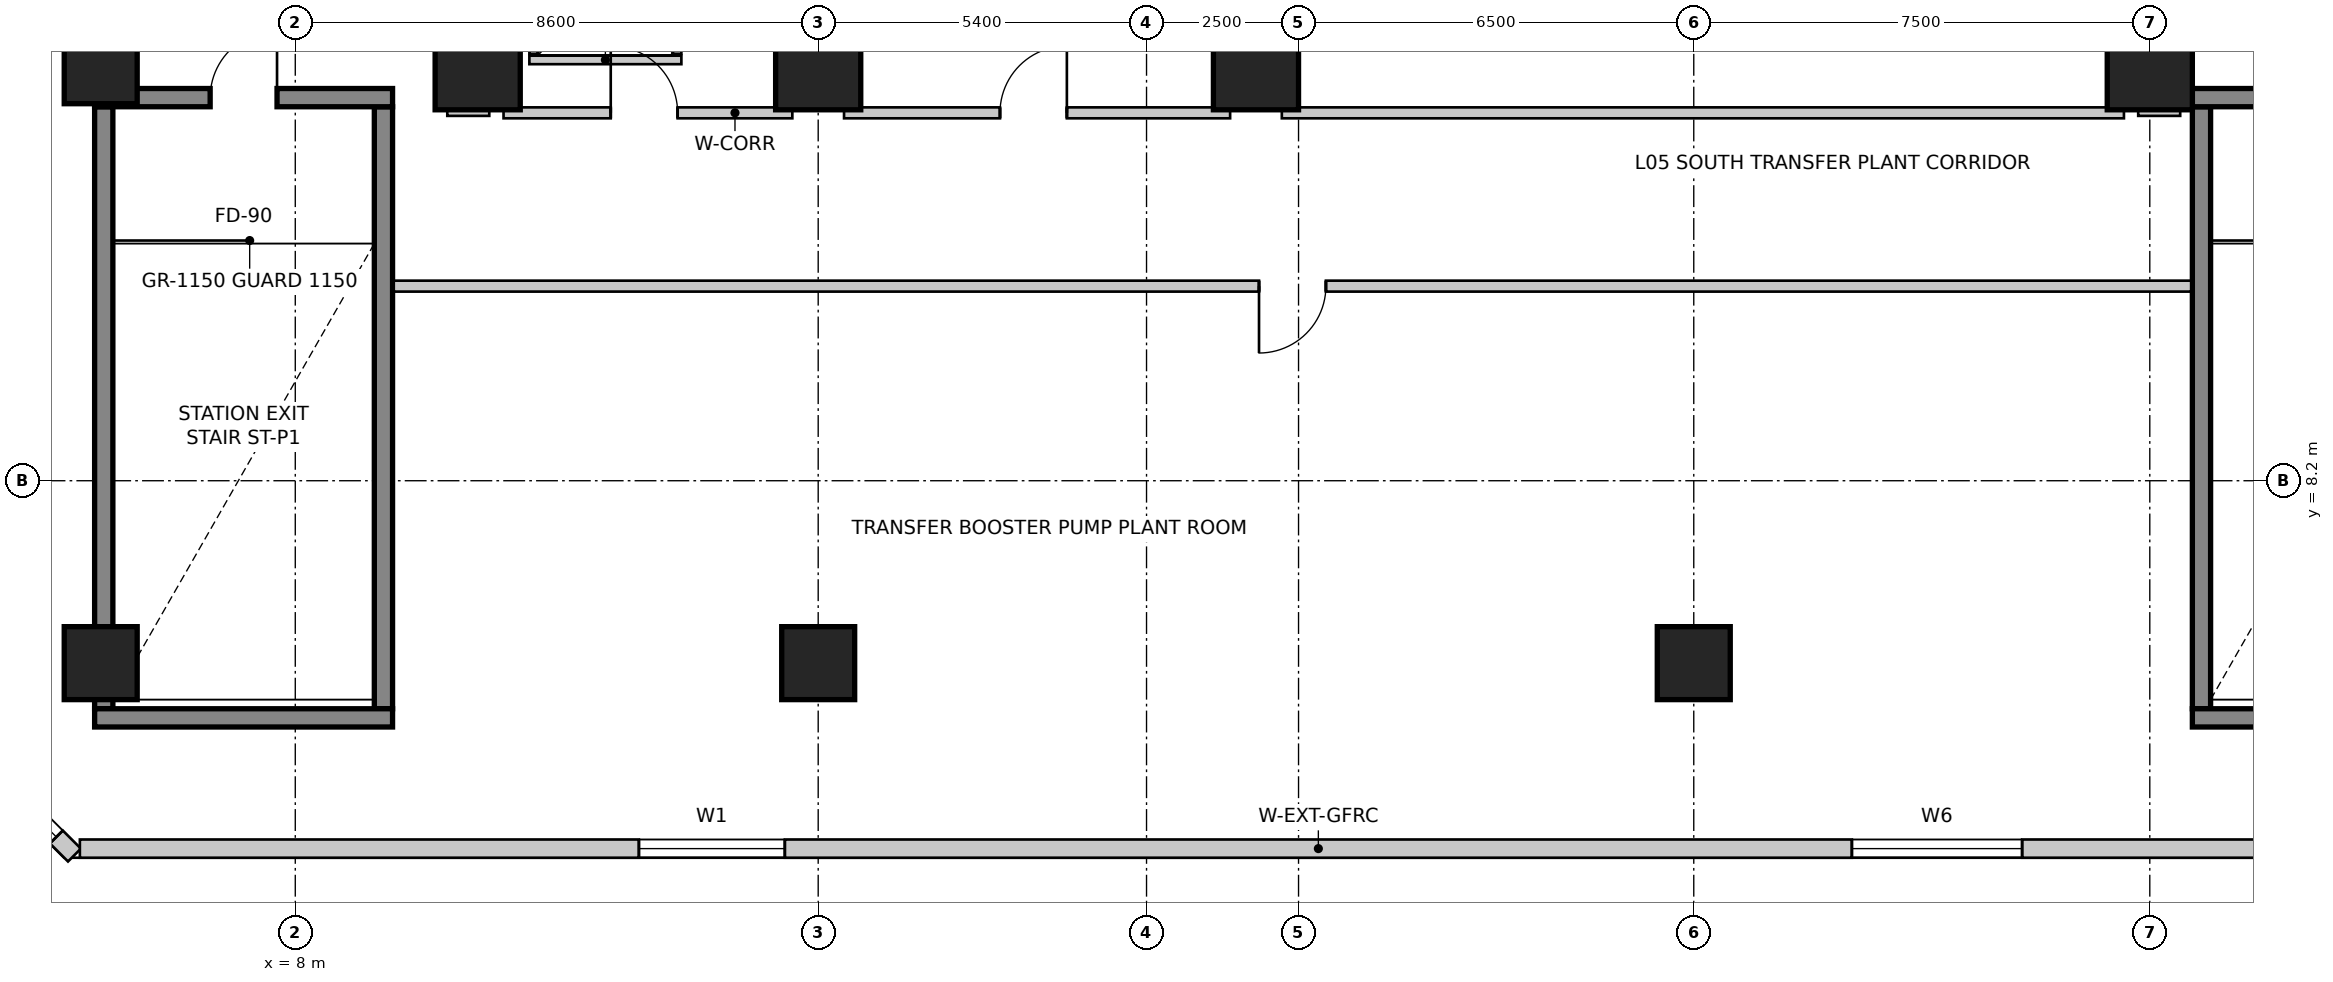
"""IFC4 building model, lengths in metres.
Left out: names, types, materials, properties, quantities, classifications, styles, units other than length and angle.
Written with IfcOpenShell. Run it as: python <this file> out.ifc"""

import sys

from ifc_helpers import new_model, si_unit, direction, frame, frame_2d, origin, origin_2d, place, context, subcontext, project, spatial, rectangle, extrude, source, transform, mapped, element, fill, save


model = new_model("IFC4")
c1 = context("Model", 3, precision=1e-05, world=origin(), true_north=direction((0.0, 1.0)))
c2 = subcontext(c1, "Body", "Model", "MODEL_VIEW")
j1 = project(units=[si_unit("LENGTHUNIT", "METRE"), si_unit("PLANEANGLEUNIT", "RADIAN")], contexts=[c1])
p1 = place(None, origin())
s1 = spatial("IfcSite", under=j1, at=p1, CompositionType="ELEMENT")
p2 = place(p1, origin())
s2 = spatial("IfcBuilding", under=s1, at=p2, CompositionType="ELEMENT")
p3 = place(p2, frame((0.0, 0.0, 21.6)))
s3 = spatial("IfcBuildingStorey", under=s2, at=p3, CompositionType="ELEMENT", Elevation=21.6)
for number, where, z_axis, x_axis in (
    (1, (4.85, 4.45, 0.0), (0.0, 0.0, 1.0), (0.0, 1.0, 0.0)),
    (2, (9.45, 4.45, 0.0), (0.0, 0.0, 1.0), (0.0, 1.0, 0.0)),
):
    element("IfcWall", number, at=place(p3, frame(where, z_axis=z_axis, x_axis=x_axis)), inside=s3, PredefinedType="SHEAR", context=c2, shape_type="SweptSolid", body=[
        extrude(rectangle(XDim=9.9, YDim=0.3, at=frame_2d((4.95, 0.0))), origin(), (0.0, 0.0, 1.0), 5.4),
    ])
p4 = place(p3, frame((4.7, 4.3, 0.0), z_axis=(0.0, 0.0, 1.0), x_axis=(1.0, 0.0, 0.0)))
e3 = element("IfcWall", 3, at=p4, inside=s3, PredefinedType="SHEAR", context=c2, shape_type="SweptSolid", body=[
    extrude(rectangle(XDim=4.9, YDim=0.3, at=frame_2d((2.45, 0.0))), origin(), (0.0, 0.0, 1.0), 5.4),
])
p5 = place(p3, frame((4.7, 14.5, 0.0), z_axis=(0.0, 0.0, 1.0), x_axis=(1.0, 0.0, 0.0)))
e4 = element("IfcWall", 4, at=p5, inside=s3, PredefinedType="SHEAR", context=c2, shape_type="SweptSolid", body=[
    extrude(rectangle(XDim=4.9, YDim=0.3, at=frame_2d((2.45, 0.0))), origin(), (0.0, 0.0, 1.0), 5.4),
])
m1 = source(origin(), c2, "Body", "SweptSolid", [
    extrude(rectangle(XDim=1.1, YDim=2.15, at=frame_2d((0.55, 1.075))), frame((0.0, 0.16, 0.0), z_axis=(0.0, -1.0, 0.0), x_axis=(1.0, 0.0, 0.0)), (0.0, 0.0, 1.0), 0.32),
])
p6 = place(p5, frame((1.9, 0.0, 0.0)))
e5 = element("IfcOpeningElement", 5, at=p6, cuts=e4, PredefinedType="OPENING", context=c2, shape_type="MappedRepresentation", body=[
    mapped(m1, transform((0.0, 0.0, 0.0), scale=1.0)),
])
p7 = place(p3, frame((39.35, 4.45, 0.0), z_axis=(0.0, 0.0, 1.0), x_axis=(0.0, 1.0, 0.0)))
e6 = element("IfcWall", 6, at=p7, inside=s3, PredefinedType="SHEAR", context=c2, shape_type="SweptSolid", body=[
    extrude(rectangle(XDim=9.9, YDim=0.3, at=frame_2d((4.95, 0.0))), origin(), (0.0, 0.0, 1.0), 5.4),
])
p8 = place(p3, frame((39.2, 4.3, 0.0), z_axis=(0.0, 0.0, 1.0), x_axis=(1.0, 0.0, 0.0)))
e7 = element("IfcWall", 7, at=p8, inside=s3, PredefinedType="SHEAR", context=c2, shape_type="SweptSolid", body=[
    extrude(rectangle(XDim=4.9, YDim=0.3, at=frame_2d((2.45, 0.0))), origin(), (0.0, 0.0, 1.0), 5.4),
])
p9 = place(p3, frame((39.2, 14.5, 0.0), z_axis=(0.0, 0.0, 1.0), x_axis=(1.0, 0.0, 0.0)))
e8 = element("IfcWall", 8, at=p9, inside=s3, PredefinedType="SHEAR", context=c2, shape_type="SweptSolid", body=[
    extrude(rectangle(XDim=4.9, YDim=0.3, at=frame_2d((2.45, 0.0))), origin(), (0.0, 0.0, 1.0), 5.4),
])
p10 = place(p9, frame((1.9, 0.0, 0.0)))
e9 = element("IfcOpeningElement", 9, at=p10, cuts=e8, PredefinedType="OPENING", context=c2, shape_type="MappedRepresentation", body=[
    mapped(m1, transform((0.0, 0.0, 0.0), scale=1.0)),
])
m2 = source(origin(), c2, "Body", "SweptSolid", [
    extrude(rectangle(XDim=1.2, YDim=1.2, at=origin_2d()), origin(), (0.0, 0.0, 1.0), 5.4),
])
for number, where, z_axis, x_axis in (
    (10, (4.8, 5.2, 0.0), (0.0, 0.0, 1.0), (1.0, 0.0, 0.0)),
    (11, (16.6, 5.2, 0.0), (0.0, 0.0, 1.0), (1.0, 0.0, 0.0)),
    (12, (31.0, 5.2, 0.0), (0.0, 0.0, 1.0), (1.0, 0.0, 0.0)),
    (13, (4.8, 15.0, 0.0), (0.0, 0.0, 1.0), (1.0, 0.0, 0.0)),
):
    element("IfcColumn", number, at=place(p3, frame(where, z_axis=z_axis, x_axis=x_axis)), inside=s3, PredefinedType="COLUMN", context=c2, shape_type="MappedRepresentation", body=[
        mapped(m2, transform((0.0, 0.0, 0.0), scale=1.0)),
    ])
m3 = source(origin(), c2, "Body", "SweptSolid", [
    extrude(rectangle(XDim=1.4, YDim=1.4, at=origin_2d()), origin(), (0.0, 0.0, 1.0), 5.4),
])
for number, where, z_axis, x_axis in (
    (14, (11.0, 15.0, 0.0), (0.0, 0.0, 1.0), (1.0, 0.0, 0.0)),
    (15, (16.6, 15.0, 0.0), (0.0, 0.0, 1.0), (1.0, 0.0, 0.0)),
    (16, (23.8, 15.0, 0.0), (0.0, 0.0, 1.0), (1.0, 0.0, 0.0)),
    (17, (38.5, 15.0, 0.0), (0.0, 0.0, 1.0), (1.0, 0.0, 0.0)),
):
    element("IfcColumn", number, at=place(p3, frame(where, z_axis=z_axis, x_axis=x_axis)), inside=s3, PredefinedType="COLUMN", context=c2, shape_type="MappedRepresentation", body=[
        mapped(m3, transform((0.0, 0.0, 0.0), scale=1.0)),
    ])
p11 = place(p3, frame((2.288, 4.124, 0.0), z_axis=(0.0, 0.0, 1.0), x_axis=(0.707106781187, -0.707106781187, 0.0)))
e18 = element("IfcWall", 18, at=p11, inside=s3, PredefinedType="SOLIDWALL", context=c2, shape_type="SweptSolid", body=[
    extrude(rectangle(XDim=2.942, YDim=0.3, at=frame_2d((1.471, 0.0))), origin(), (0.0, 0.0, 1.0), 5.05),
])
m4 = source(origin(), c2, "Body", "SweptSolid", [
    extrude(rectangle(XDim=2.1, YDim=2.0, at=frame_2d((1.05, 1.0))), frame((0.0, 0.16, 0.0), z_axis=(0.0, -1.0, 0.0), x_axis=(1.0, 0.0, 0.0)), (0.0, 0.0, 1.0), 0.32),
])
p12 = place(p11, frame((0.421, 0.0, 0.85)))
e19 = element("IfcOpeningElement", 19, at=p12, cuts=e18, PredefinedType="OPENING", context=c2, shape_type="MappedRepresentation", body=[
    mapped(m4, transform((0.0, 0.0, 0.0), scale=1.0)),
])
p13 = place(p3, frame((4.457, 2.15, 0.0), z_axis=(0.0, 0.0, 1.0), x_axis=(1.0, 0.0, 0.0)))
e20 = element("IfcWall", 20, at=p13, inside=s3, PredefinedType="SOLIDWALL", context=c2, shape_type="SweptSolid", body=[
    extrude(rectangle(XDim=61.085, YDim=0.3, at=frame_2d((30.543, 0.0))), origin(), (0.0, 0.0, 1.0), 5.05),
])
m5 = source(origin(), c2, "Body", "SweptSolid", [
    extrude(rectangle(XDim=2.4, YDim=2.2, at=frame_2d((1.2, 1.1))), frame((0.0, 0.16, 0.0), z_axis=(0.0, -1.0, 0.0), x_axis=(1.0, 0.0, 0.0)), (0.0, 0.0, 1.0), 0.32),
])
p14 = place(p13, frame((9.194, 0.0, 0.85)))
e21 = element("IfcOpeningElement", 21, at=p14, cuts=e20, PredefinedType="OPENING", context=c2, shape_type="MappedRepresentation", body=[
    mapped(m5, transform((0.0, 0.0, 0.0), scale=1.0)),
])
m6 = source(origin(), c2, "Body", "SweptSolid", [
    extrude(rectangle(XDim=2.8, YDim=2.4, at=frame_2d((1.4, 1.2))), frame((0.0, 0.16, 0.0), z_axis=(0.0, -1.0, 0.0), x_axis=(1.0, 0.0, 0.0)), (0.0, 0.0, 1.0), 0.32),
])
p15 = place(p13, frame((29.143, 0.0, 0.85)))
e22 = element("IfcOpeningElement", 22, at=p15, cuts=e20, PredefinedType="OPENING", context=c2, shape_type="MappedRepresentation", body=[
    mapped(m6, transform((0.0, 0.0, 0.0), scale=1.0)),
])
p16 = place(p13, frame((49.491, 0.0, 0.85)))
e23 = element("IfcOpeningElement", 23, at=p16, cuts=e20, PredefinedType="OPENING", context=c2, shape_type="MappedRepresentation", body=[
    mapped(m5, transform((0.0, 0.0, 0.0), scale=1.0)),
])
p17 = place(p3, frame((11.85, 15.12, 0.0), z_axis=(0.0, 0.0, 1.0), x_axis=(1.0, 0.0, 0.0)))
e24 = element("IfcWall", 24, at=p17, inside=s3, PredefinedType="SOLIDWALL", context=c2, shape_type="SweptSolid", body=[
    extrude(rectangle(XDim=2.5, YDim=0.14, at=frame_2d((1.25, 0.0))), origin(), (0.0, 0.0, 1.0), 3.822),
])
for number, where, z_axis, x_axis in (
    (25, (11.92, 15.22, 0.0), (0.0, 0.0, 1.0), (0.0, 1.0, 0.0)),
    (26, (14.28, 15.22, 0.0), (0.0, 0.0, 1.0), (0.0, 1.0, 0.0)),
):
    element("IfcWall", number, at=place(p3, frame(where, z_axis=z_axis, x_axis=x_axis)), inside=s3, PredefinedType="SOLIDWALL", context=c2, shape_type="SweptSolid", body=[
        extrude(rectangle(XDim=2.56, YDim=0.14, at=frame_2d((1.28, 0.0))), origin(), (0.0, 0.0, 1.0), 5.05),
    ])
p18 = place(p3, frame((11.425, 14.25, 0.0), z_axis=(0.0, 0.0, 1.0), x_axis=(1.0, 0.0, 0.0)))
e27 = element("IfcWall", 27, at=p18, inside=s3, PredefinedType="PARTITIONING", context=c2, shape_type="SweptSolid", body=[
    extrude(rectangle(XDim=4.75, YDim=0.18, at=frame_2d((2.375, 0.0))), origin(), (0.0, 0.0, 1.0), 5.05),
])
m7 = source(origin(), c2, "Body", "SweptSolid", [
    extrude(rectangle(XDim=1.1, YDim=2.15, at=frame_2d((0.55, 1.075))), frame((0.0, 0.1, 0.0), z_axis=(0.0, -1.0, 0.0), x_axis=(1.0, 0.0, 0.0)), (0.0, 0.0, 1.0), 0.2),
])
p19 = place(p18, frame((1.763, 0.0, 0.0)))
e28 = element("IfcOpeningElement", 28, at=p19, cuts=e27, PredefinedType="OPENING", context=c2, shape_type="MappedRepresentation", body=[
    mapped(m7, transform((0.0, 0.0, 0.0), scale=1.0)),
])
p20 = place(p3, frame((17.025, 14.25, 0.0), z_axis=(0.0, 0.0, 1.0), x_axis=(1.0, 0.0, 0.0)))
e29 = element("IfcWall", 29, at=p20, inside=s3, PredefinedType="PARTITIONING", context=c2, shape_type="SweptSolid", body=[
    extrude(rectangle(XDim=6.35, YDim=0.18, at=frame_2d((3.175, 0.0))), origin(), (0.0, 0.0, 1.0), 5.05),
])
p21 = place(p20, frame((2.565, 0.0, 0.0)))
e30 = element("IfcOpeningElement", 30, at=p21, cuts=e29, PredefinedType="OPENING", context=c2, shape_type="MappedRepresentation", body=[
    mapped(m7, transform((0.0, 0.0, 0.0), scale=1.0)),
])
p22 = place(p3, frame((24.225, 14.25, 0.0), z_axis=(0.0, 0.0, 1.0), x_axis=(1.0, 0.0, 0.0)))
e31 = element("IfcWall", 31, at=p22, inside=s3, PredefinedType="PARTITIONING", context=c2, shape_type="SweptSolid", body=[
    extrude(rectangle(XDim=13.85, YDim=0.18, at=frame_2d((6.925, 0.0))), origin(), (0.0, 0.0, 1.0), 5.05),
])
p23 = place(p3, frame((39.18, 11.4, 0.0), z_axis=(0.0, 0.0, 1.0), x_axis=(-1.0, 0.0, 0.0)))
e32 = element("IfcWall", 32, at=p23, inside=s3, PredefinedType="PARTITIONING", context=c2, shape_type="SweptSolid", body=[
    extrude(rectangle(XDim=29.56, YDim=0.18, at=frame_2d((14.78, 0.0))), origin(), (0.0, 0.0, 1.0), 5.05),
])
p24 = place(p23, frame((14.23, 0.0, 0.0)))
e33 = element("IfcOpeningElement", 33, at=p24, cuts=e32, PredefinedType="OPENING", context=c2, shape_type="MappedRepresentation", body=[
    mapped(m7, transform((0.0, 0.0, 0.0), scale=1.0)),
])
p25 = place(p3, frame((11.5, 33.362, 0.0), z_axis=(0.0, 0.0, 1.0), x_axis=(0.0, -1.0, 0.0)))
e34 = element("IfcWall", 34, at=p25, inside=s3, PredefinedType="SOLIDWALL", context=c2, shape_type="SweptSolid", body=[
    extrude(rectangle(XDim=18.872, YDim=0.2, at=frame_2d((9.436, 0.0))), origin(), (0.0, 0.0, 1.0), 3.042),
])
p26 = place(p3, frame((11.191, 14.3, 0.0), z_axis=(0.0, 0.0, 1.0), x_axis=(-1.0, 0.0, 0.0)))
e35 = element("IfcWall", 35, at=p26, inside=s3, PredefinedType="SOLIDWALL", context=c2, shape_type="SweptSolid", body=[
    extrude(rectangle(XDim=0.691, YDim=0.2, at=frame_2d((0.345, 0.0))), origin(), (0.0, 0.0, 1.0), 5.05),
])
p27 = place(p3, frame((10.5, 14.3, 0.0), z_axis=(0.0, 0.0, 1.0), x_axis=(0.0, 1.0, 0.0)))
e36 = element("IfcWall", 36, at=p27, inside=s3, PredefinedType="SOLIDWALL", context=c2, shape_type="SweptSolid", body=[
    extrude(rectangle(XDim=19.112, YDim=0.2, at=frame_2d((9.556, 0.0))), origin(), (0.0, 0.0, 1.0), 3.042),
])
for number, where, z_axis, x_axis in (
    (37, (17.1, 33.362, 0.0), (0.0, 0.0, 1.0), (0.0, -1.0, 0.0)),
    (38, (16.1, 14.49, 0.0), (0.0, 0.0, 1.0), (0.0, 1.0, 0.0)),
):
    element("IfcWall", number, at=place(p3, frame(where, z_axis=z_axis, x_axis=x_axis)), inside=s3, PredefinedType="SOLIDWALL", context=c2, shape_type="SweptSolid", body=[
        extrude(rectangle(XDim=18.872, YDim=0.2, at=frame_2d((9.436, 0.0))), origin(), (0.0, 0.0, 1.0), 3.042),
    ])
p28 = place(p3, frame((24.3, 29.265, 0.0), z_axis=(0.0, 0.0, 1.0), x_axis=(0.0, -1.0, 0.0)))
e39 = element("IfcWall", 39, at=p28, inside=s3, PredefinedType="SOLIDWALL", context=c2, shape_type="SweptSolid", body=[
    extrude(rectangle(XDim=14.775, YDim=0.2, at=frame_2d((7.388, 0.0))), origin(), (0.0, 0.0, 1.0), 3.042),
])
p29 = place(p3, frame((23.3, 14.49, 0.0), z_axis=(0.0, 0.0, 1.0), x_axis=(0.0, 1.0, 0.0)))
e40 = element("IfcWall", 40, at=p29, inside=s3, PredefinedType="SOLIDWALL", context=c2, shape_type="SweptSolid", body=[
    extrude(rectangle(XDim=18.872, YDim=0.2, at=frame_2d((9.436, 0.0))), origin(), (0.0, 0.0, 1.0), 3.042),
])
p30 = place(p3, frame((39.0, 33.412, 0.0), z_axis=(0.0, 0.0, 1.0), x_axis=(0.0, -1.0, 0.0)))
e41 = element("IfcWall", 41, at=p30, inside=s3, PredefinedType="SOLIDWALL", context=c2, shape_type="SweptSolid", body=[
    extrude(rectangle(XDim=18.78, YDim=0.2, at=frame_2d((9.39, 0.0))), origin(), (0.0, 0.0, 1.0), 3.042),
])
p31 = place(p3, frame((39.0, 14.3, 0.0), z_axis=(0.0, 0.0, 1.0), x_axis=(-1.0, 0.0, 0.0)))
e42 = element("IfcWall", 42, at=p31, inside=s3, PredefinedType="SOLIDWALL", context=c2, shape_type="SweptSolid", body=[
    extrude(rectangle(XDim=0.691, YDim=0.2, at=frame_2d((0.345, 0.0))), origin(), (0.0, 0.0, 1.0), 5.05),
])
p32 = place(p3, frame((38.0, 14.49, 0.0), z_axis=(0.0, 0.0, 1.0), x_axis=(0.0, 1.0, 0.0)))
e43 = element("IfcWall", 43, at=p32, inside=s3, PredefinedType="SOLIDWALL", context=c2, shape_type="SweptSolid", body=[
    extrude(rectangle(XDim=14.775, YDim=0.2, at=frame_2d((7.388, 0.0))), origin(), (0.0, 0.0, 1.0), 3.042),
])
m8 = source(origin(), c2, "Body", "SweptSolid", [
    extrude(rectangle(XDim=2.1, YDim=2.0, at=frame_2d((1.05, 1.0))), frame((0.0, -0.015, 0.0), z_axis=(0.0, -1.0, 0.0), x_axis=(1.0, 0.0, 0.0)), (0.0, 0.0, 1.0), 0.06),
])
p33 = place(p12, origin())
e44 = element("IfcWindow", 44, at=p33, inside=s3, PartitioningType="SINGLE_PANEL", PredefinedType="WINDOW", context=c2, shape_type="MappedRepresentation", body=[
    mapped(m8, transform((0.0, 0.0, 0.0), scale=1.0)),
])
fill(e19, e44)
m9 = source(origin(), c2, "Body", "SweptSolid", [
    extrude(rectangle(XDim=2.4, YDim=2.2, at=frame_2d((1.2, 1.1))), frame((0.0, -0.015, 0.0), z_axis=(0.0, -1.0, 0.0), x_axis=(1.0, 0.0, 0.0)), (0.0, 0.0, 1.0), 0.06),
])
p34 = place(p14, origin())
e45 = element("IfcWindow", 45, at=p34, inside=s3, PartitioningType="SINGLE_PANEL", PredefinedType="WINDOW", context=c2, shape_type="MappedRepresentation", body=[
    mapped(m9, transform((0.0, 0.0, 0.0), scale=1.0)),
])
fill(e21, e45)
m10 = source(origin(), c2, "Body", "SweptSolid", [
    extrude(rectangle(XDim=2.8, YDim=2.4, at=frame_2d((1.4, 1.2))), frame((0.0, -0.015, 0.0), z_axis=(0.0, -1.0, 0.0), x_axis=(1.0, 0.0, 0.0)), (0.0, 0.0, 1.0), 0.06),
])
p35 = place(p15, origin())
e46 = element("IfcWindow", 46, at=p35, inside=s3, PartitioningType="SINGLE_PANEL", PredefinedType="WINDOW", context=c2, shape_type="MappedRepresentation", body=[
    mapped(m10, transform((0.0, 0.0, 0.0), scale=1.0)),
])
fill(e22, e46)
m11 = source(origin(), c2, "Body", "SweptSolid", [
    extrude(rectangle(XDim=1.1, YDim=2.15, at=frame_2d((0.55, 1.075))), frame((0.0, 0.025, 0.0), z_axis=(0.0, -1.0, 0.0), x_axis=(1.0, 0.0, 0.0)), (0.0, 0.0, 1.0), 0.05),
])
p36 = place(p6, origin())
e47 = element("IfcDoor", 47, at=p36, inside=s3, OperationType="SINGLE_SWING_RIGHT", PredefinedType="DOOR", context=c2, shape_type="MappedRepresentation", body=[
    mapped(m11, transform((0.0, 0.0, 0.0), scale=1.0)),
])
fill(e5, e47)
p37 = place(p19, origin())
e48 = element("IfcDoor", 48, at=p37, inside=s3, OperationType="SINGLE_SWING_LEFT", PredefinedType="DOOR", context=c2, shape_type="MappedRepresentation", body=[
    mapped(m11, transform((0.0, 0.0, 0.0), scale=1.0)),
])
fill(e28, e48)
p38 = place(p21, origin())
e49 = element("IfcDoor", 49, at=p38, inside=s3, OperationType="SINGLE_SWING_RIGHT", PredefinedType="DOOR", context=c2, shape_type="MappedRepresentation", body=[
    mapped(m11, transform((0.0, 0.0, 0.0), scale=1.0)),
])
fill(e30, e49)
p39 = place(p24, origin())
e50 = element("IfcDoor", 50, at=p39, inside=s3, OperationType="SINGLE_SWING_RIGHT", PredefinedType="DOOR", context=c2, shape_type="MappedRepresentation", body=[
    mapped(m11, transform((0.0, 0.0, 0.0), scale=1.0)),
])
fill(e33, e50)
save(model, sys.argv[1])
